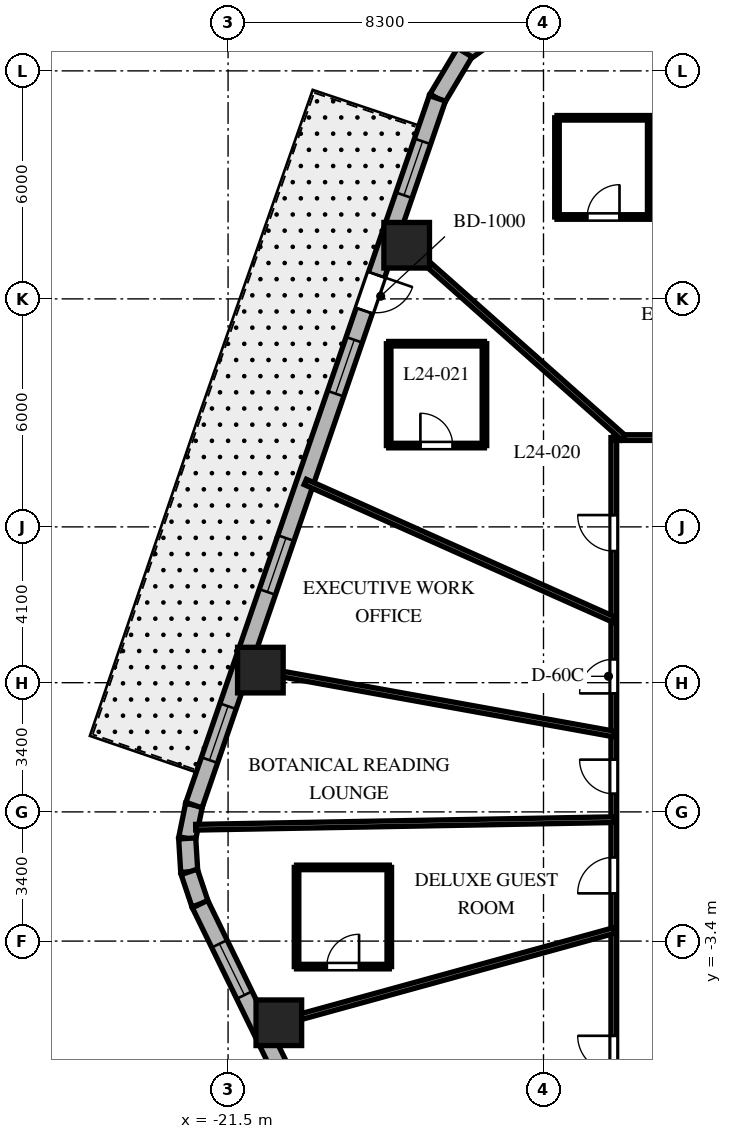
"""IFC4 building model, lengths in metres.
Left out: names, types, materials, properties, quantities, classifications, styles, units other than length and angle.
Written with IfcOpenShell. Run it as: python <this file> out.ifc"""

import sys

from ifc_helpers import new_model, si_unit, direction, frame, frame_2d, origin, origin_2d, place, context, subcontext, project, spatial, rectangle, extrude, element, fill, save


model = new_model("IFC4")
c1 = context("Model", 3, precision=1e-05, world=origin(), true_north=direction((0.0, 1.0)))
c2 = subcontext(c1, "Body", "Model", "MODEL_VIEW")
j1 = project(units=[si_unit("LENGTHUNIT", "METRE"), si_unit("PLANEANGLEUNIT", "RADIAN")], contexts=[c1])
p1 = place(None, origin())
s1 = spatial("IfcSite", under=j1, at=p1, CompositionType="ELEMENT")
p2 = place(p1, origin())
s2 = spatial("IfcBuilding", under=s1, at=p2, CompositionType="ELEMENT")
p3 = place(p2, frame((0.0, 0.0, 102.5)))
s3 = spatial("IfcBuildingStorey", under=s2, at=p3, CompositionType="ELEMENT", Elevation=102.5)
for number, where, z_axis, x_axis in (
    (1, (-16.8, 14.911, 0.0), (0.0, 0.0, 1.0), (1.0, 0.0, 0.0)),
    (2, (-20.65, 3.731, 0.0), (0.0, 0.0, 1.0), (1.0, 0.0, 0.0)),
    (3, (-20.164, -5.549, 0.0), (0.0, 0.0, 1.0), (1.0, 0.0, 0.0)),
):
    element("IfcColumn", number, at=place(p3, frame(where, z_axis=z_axis, x_axis=x_axis)), inside=s3, PredefinedType="COLUMN", context=c2, shape_type="SweptSolid", body=[
        extrude(rectangle(XDim=1.2, YDim=1.2, at=origin_2d()), origin(), (0.0, 0.0, 1.0), 3.7),
    ])
p4 = place(p3, frame((-14.146, 20.787, 0.0), z_axis=(0.0, 0.0, 1.0), x_axis=(-0.814162929117, -0.580636482536, 0.0)))
e4 = element("IfcWall", 4, at=p4, inside=s3, PredefinedType="SOLIDWALL", context=c2, shape_type="SweptSolid", body=[
    extrude(rectangle(XDim=1.382, YDim=0.45, at=frame_2d((0.691, 0.0))), origin(), (0.0, 0.0, 1.0), 3.4),
])
p5 = place(p3, frame((-15.272, 19.984, 0.0), z_axis=(0.0, 0.0, 1.0), x_axis=(-0.512579347361, -0.858639862025, 0.0)))
e5 = element("IfcWall", 5, at=p5, inside=s3, PredefinedType="SOLIDWALL", context=c2, shape_type="SweptSolid", body=[
    extrude(rectangle(XDim=1.406, YDim=0.45, at=frame_2d((0.703, 0.0))), origin(), (0.0, 0.0, 1.0), 3.4),
])
p6 = place(p3, frame((-22.397, 0.179, 0.0), z_axis=(0.0, 0.0, 1.0), x_axis=(-0.199313589404, -0.979935759669, 0.0)))
e6 = element("IfcWall", 6, at=p6, inside=s3, PredefinedType="SOLIDWALL", context=c2, shape_type="SweptSolid", body=[
    extrude(rectangle(XDim=0.896, YDim=0.45, at=frame_2d((0.448, 0.0))), origin(), (0.0, 0.0, 1.0), 3.4),
])
p7 = place(p3, frame((-22.575, -0.698, 0.0), z_axis=(0.0, 0.0, 1.0), x_axis=(0.060980441946, -0.998138961117, 0.0)))
e7 = element("IfcWall", 7, at=p7, inside=s3, PredefinedType="SOLIDWALL", context=c2, shape_type="SweptSolid", body=[
    extrude(rectangle(XDim=0.881, YDim=0.45, at=frame_2d((0.44, 0.0))), origin(), (0.0, 0.0, 1.0), 3.4),
])
p8 = place(p3, frame((-22.522, -1.577, 0.0), z_axis=(0.0, 0.0, 1.0), x_axis=(0.317372694837, -0.948300887151, 0.0)))
e8 = element("IfcWall", 8, at=p8, inside=s3, PredefinedType="SOLIDWALL", context=c2, shape_type="SweptSolid", body=[
    extrude(rectangle(XDim=0.896, YDim=0.45, at=frame_2d((0.448, 0.0))), origin(), (0.0, 0.0, 1.0), 3.4),
])
p9 = place(p3, frame((-15.992, 18.777, 0.0), z_axis=(0.0, 0.0, 1.0), x_axis=(-0.325606988926, -0.945505202927, 0.0)))
e9 = element("IfcWall", 9, at=p9, inside=s3, PredefinedType="SOLIDWALL", context=c2, shape_type="SweptSolid", body=[
    extrude(rectangle(XDim=19.669, YDim=0.45, at=frame_2d((9.835, 0.0))), origin(), (0.0, 0.0, 1.0), 3.4),
])
p10 = place(p9, frame((4.909, 0.0, 0.0)))
e10 = element("IfcOpeningElement", 10, at=p10, cuts=e9, PredefinedType="OPENING", context=c2, shape_type="SweptSolid", body=[
    extrude(rectangle(XDim=1.0, YDim=2.15, at=frame_2d((0.5, 1.075))), frame((0.0, 0.235, 0.0), z_axis=(0.0, -1.0, 0.0), x_axis=(1.0, 0.0, 0.0)), (0.0, 0.0, 1.0), 0.47),
])
p11 = place(p9, frame((1.197, 0.0, 0.8)))
e11 = element("IfcOpeningElement", 11, at=p11, cuts=e9, PredefinedType="OPENING", context=c2, shape_type="SweptSolid", body=[
    extrude(rectangle(XDim=1.5, YDim=1.8, at=frame_2d((0.75, 0.9))), frame((0.0, 0.235, 0.0), z_axis=(0.0, -1.0, 0.0), x_axis=(1.0, 0.0, 0.0)), (0.0, 0.0, 1.0), 0.47),
])
p12 = place(p9, frame((6.72, 0.0, 0.8)))
e12 = element("IfcOpeningElement", 12, at=p12, cuts=e9, PredefinedType="OPENING", context=c2, shape_type="SweptSolid", body=[
    extrude(rectangle(XDim=1.5, YDim=1.8, at=frame_2d((0.75, 0.9))), frame((0.0, 0.235, 0.0), z_axis=(0.0, -1.0, 0.0), x_axis=(1.0, 0.0, 0.0)), (0.0, 0.0, 1.0), 0.47),
])
p13 = place(p9, frame((12.238, 0.0, 0.8)))
e13 = element("IfcOpeningElement", 13, at=p13, cuts=e9, PredefinedType="OPENING", context=c2, shape_type="SweptSolid", body=[
    extrude(rectangle(XDim=1.5, YDim=1.8, at=frame_2d((0.75, 0.9))), frame((0.0, 0.235, 0.0), z_axis=(0.0, -1.0, 0.0), x_axis=(1.0, 0.0, 0.0)), (0.0, 0.0, 1.0), 0.47),
])
p14 = place(p9, frame((16.918, 0.0, 0.8)))
e14 = element("IfcOpeningElement", 14, at=p14, cuts=e9, PredefinedType="OPENING", context=c2, shape_type="SweptSolid", body=[
    extrude(rectangle(XDim=1.5, YDim=1.8, at=frame_2d((0.75, 0.9))), frame((0.0, 0.235, 0.0), z_axis=(0.0, -1.0, 0.0), x_axis=(1.0, 0.0, 0.0)), (0.0, 0.0, 1.0), 0.47),
])
p15 = place(p3, frame((-22.238, -2.427, 0.0), z_axis=(0.0, 0.0, 1.0), x_axis=(0.438374803278, -0.898792262901, 0.0)))
e15 = element("IfcWall", 15, at=p15, inside=s3, PredefinedType="SOLIDWALL", context=c2, shape_type="SweptSolid", body=[
    extrude(rectangle(XDim=18.618, YDim=0.45, at=frame_2d((9.309, 0.0))), origin(), (0.0, 0.0, 1.0), 3.4),
])
p16 = place(p15, frame((1.163, 0.0, 0.8)))
e16 = element("IfcOpeningElement", 16, at=p16, cuts=e15, PredefinedType="OPENING", context=c2, shape_type="SweptSolid", body=[
    extrude(rectangle(XDim=1.5, YDim=1.8, at=frame_2d((0.75, 0.9))), frame((0.0, 0.235, 0.0), z_axis=(0.0, -1.0, 0.0), x_axis=(1.0, 0.0, 0.0)), (0.0, 0.0, 1.0), 0.47),
])
p17 = place(p15, frame((8.61, 0.0, 0.8)))
e17 = element("IfcOpeningElement", 17, at=p17, cuts=e15, PredefinedType="OPENING", context=c2, shape_type="SweptSolid", body=[
    extrude(rectangle(XDim=1.5, YDim=1.8, at=frame_2d((0.75, 0.9))), frame((0.0, 0.235, 0.0), z_axis=(0.0, -1.0, 0.0), x_axis=(1.0, 0.0, 0.0)), (0.0, 0.0, 1.0), 0.47),
])
p18 = place(p15, frame((16.006, 0.0, 0.8)))
e18 = element("IfcOpeningElement", 18, at=p18, cuts=e15, PredefinedType="OPENING", context=c2, shape_type="SweptSolid", body=[
    extrude(rectangle(XDim=1.5, YDim=1.8, at=frame_2d((0.75, 0.9))), frame((0.0, 0.235, 0.0), z_axis=(0.0, -1.0, 0.0), x_axis=(1.0, 0.0, 0.0)), (0.0, 0.0, 1.0), 0.47),
])
p19 = place(p3, frame((-11.35, -9.85, 0.0), z_axis=(0.0, 0.0, 1.0), x_axis=(0.0, 1.0, 0.0)))
e19 = element("IfcWall", 19, at=p19, inside=s3, PredefinedType="PARTITIONING", context=c2, shape_type="SweptSolid", body=[
    extrude(rectangle(XDim=19.7, YDim=0.15, at=frame_2d((9.85, 0.0))), origin(), (0.0, 0.0, 1.0), 2.84),
])
p20 = place(p19, frame((16.711, 0.0, 0.0)))
e20 = element("IfcOpeningElement", 20, at=p20, cuts=e19, PredefinedType="OPENING", context=c2, shape_type="SweptSolid", body=[
    extrude(rectangle(XDim=0.95, YDim=2.03, at=frame_2d((0.475, 1.015))), frame((0.0, 0.085, 0.0), z_axis=(0.0, -1.0, 0.0), x_axis=(1.0, 0.0, 0.0)), (0.0, 0.0, 1.0), 0.17),
])
p21 = place(p19, frame((12.968, 0.0, 0.0)))
e21 = element("IfcOpeningElement", 21, at=p21, cuts=e19, PredefinedType="OPENING", context=c2, shape_type="SweptSolid", body=[
    extrude(rectangle(XDim=0.9, YDim=2.03, at=frame_2d((0.45, 1.015))), frame((0.0, 0.085, 0.0), z_axis=(0.0, -1.0, 0.0), x_axis=(1.0, 0.0, 0.0)), (0.0, 0.0, 1.0), 0.17),
])
p22 = place(p19, frame((10.325, 0.0, 0.0)))
e22 = element("IfcOpeningElement", 22, at=p22, cuts=e19, PredefinedType="OPENING", context=c2, shape_type="SweptSolid", body=[
    extrude(rectangle(XDim=0.9, YDim=2.03, at=frame_2d((0.45, 1.015))), frame((0.0, 0.085, 0.0), z_axis=(0.0, -1.0, 0.0), x_axis=(1.0, 0.0, 0.0)), (0.0, 0.0, 1.0), 0.17),
])
p23 = place(p19, frame((7.706, 0.0, 0.0)))
e23 = element("IfcOpeningElement", 23, at=p23, cuts=e19, PredefinedType="OPENING", context=c2, shape_type="SweptSolid", body=[
    extrude(rectangle(XDim=0.95, YDim=2.03, at=frame_2d((0.475, 1.015))), frame((0.0, 0.085, 0.0), z_axis=(0.0, -1.0, 0.0), x_axis=(1.0, 0.0, 0.0)), (0.0, 0.0, 1.0), 0.17),
])
p24 = place(p19, frame((3.008, 0.0, 0.0)))
e24 = element("IfcOpeningElement", 24, at=p24, cuts=e19, PredefinedType="OPENING", context=c2, shape_type="SweptSolid", body=[
    extrude(rectangle(XDim=0.95, YDim=2.03, at=frame_2d((0.475, 1.015))), frame((0.0, 0.085, 0.0), z_axis=(0.0, -1.0, 0.0), x_axis=(1.0, 0.0, 0.0)), (0.0, 0.0, 1.0), 0.17),
])
p25 = place(p3, frame((-11.35, 9.85, 0.0), z_axis=(0.0, 0.0, 1.0), x_axis=(1.0, 0.0, 0.0)))
e25 = element("IfcWall", 25, at=p25, inside=s3, PredefinedType="PARTITIONING", context=c2, shape_type="SweptSolid", body=[
    extrude(rectangle(XDim=22.7, YDim=0.15, at=frame_2d((11.35, 0.0))), origin(), (0.0, 0.0, 1.0), 2.84),
])
p26 = place(p25, frame((17.237, 0.0, 0.0)))
e26 = element("IfcOpeningElement", 26, at=p26, cuts=e25, PredefinedType="OPENING", context=c2, shape_type="SweptSolid", body=[
    extrude(rectangle(XDim=0.95, YDim=2.03, at=frame_2d((0.475, 1.015))), frame((0.0, 0.085, 0.0), z_axis=(0.0, -1.0, 0.0), x_axis=(1.0, 0.0, 0.0)), (0.0, 0.0, 1.0), 0.17),
])
p27 = place(p25, frame((10.45, 0.0, 0.0)))
e27 = element("IfcOpeningElement", 27, at=p27, cuts=e25, PredefinedType="OPENING", context=c2, shape_type="SweptSolid", body=[
    extrude(rectangle(XDim=0.95, YDim=2.03, at=frame_2d((0.475, 1.015))), frame((0.0, 0.085, 0.0), z_axis=(0.0, -1.0, 0.0), x_axis=(1.0, 0.0, 0.0)), (0.0, 0.0, 1.0), 0.17),
])
p28 = place(p25, frame((3.399, 0.0, 0.0)))
e28 = element("IfcOpeningElement", 28, at=p28, cuts=e25, PredefinedType="OPENING", context=c2, shape_type="SweptSolid", body=[
    extrude(rectangle(XDim=0.95, YDim=2.03, at=frame_2d((0.475, 1.015))), frame((0.0, 0.085, 0.0), z_axis=(0.0, -1.0, 0.0), x_axis=(1.0, 0.0, 0.0)), (0.0, 0.0, 1.0), 0.17),
])
p29 = place(p3, frame((-11.098, 9.85, 0.0), z_axis=(0.0, 0.0, 1.0), x_axis=(-0.747904295103, 0.663806572253, 0.0)))
e29 = element("IfcWall", 29, at=p29, inside=s3, PredefinedType="PARTITIONING", context=c2, shape_type="SweptSolid", body=[
    extrude(rectangle(XDim=8.16, YDim=0.15, at=frame_2d((4.08, 0.0))), origin(), (0.0, 0.0, 1.0), 2.54),
])
p30 = place(p3, frame((-11.35, 5.062, 0.0), z_axis=(0.0, 0.0, 1.0), x_axis=(-0.91329663997, 0.407295037312, 0.0)))
e30 = element("IfcWall", 30, at=p30, inside=s3, PredefinedType="PARTITIONING", context=c2, shape_type="SweptSolid", body=[
    extrude(rectangle(XDim=8.889, YDim=0.15, at=frame_2d((4.445, 0.0))), origin(), (0.0, 0.0, 1.0), 2.54),
])
p31 = place(p3, frame((-11.35, 2.051, 0.0), z_axis=(0.0, 0.0, 1.0), x_axis=(-0.984068313063, 0.177790762484, 0.0)))
e31 = element("IfcWall", 31, at=p31, inside=s3, PredefinedType="PARTITIONING", context=c2, shape_type="SweptSolid", body=[
    extrude(rectangle(XDim=9.951, YDim=0.15, at=frame_2d((4.976, 0.0))), origin(), (0.0, 0.0, 1.0), 2.54),
])
p32 = place(p3, frame((-11.35, -0.205, 0.0), z_axis=(0.0, 0.0, 1.0), x_axis=(-0.999836907568, -0.018059852275, 0.0)))
e32 = element("IfcWall", 32, at=p32, inside=s3, PredefinedType="PARTITIONING", context=c2, shape_type="SweptSolid", body=[
    extrude(rectangle(XDim=11.004, YDim=0.15, at=frame_2d((5.502, 0.0))), origin(), (0.0, 0.0, 1.0), 2.54),
])
p33 = place(p3, frame((-11.35, -3.123, 0.0), z_axis=(0.0, 0.0, 1.0), x_axis=(-0.964151983214, -0.265350623261, 0.0)))
e33 = element("IfcWall", 33, at=p33, inside=s3, PredefinedType="PARTITIONING", context=c2, shape_type="SweptSolid", body=[
    extrude(rectangle(XDim=9.645, YDim=0.15, at=frame_2d((4.823, 0.0))), origin(), (0.0, 0.0, 1.0), 2.54),
])
p34 = place(p3, frame((-12.845, 15.655, 0.0), z_axis=(0.0, 0.0, 1.0), x_axis=(1.0, 0.0, 0.0)))
e34 = element("IfcWall", 34, at=p34, inside=s3, PredefinedType="PARTITIONING", context=c2, shape_type="SweptSolid", body=[
    extrude(rectangle(XDim=2.44, YDim=0.12, at=frame_2d((1.22, 0.0))), origin(), (0.0, 0.0, 1.0), 3.4),
])
p35 = place(p34, frame((0.795, 0.0, 0.0)))
e35 = element("IfcOpeningElement", 35, at=p35, cuts=e34, PredefinedType="OPENING", context=c2, shape_type="SweptSolid", body=[
    extrude(rectangle(XDim=0.85, YDim=2.03, at=frame_2d((0.425, 1.015))), frame((0.0, 0.07, 0.0), z_axis=(0.0, -1.0, 0.0), x_axis=(1.0, 0.0, 0.0)), (0.0, 0.0, 1.0), 0.14),
])
p36 = place(p3, frame((-10.405, 15.655, 0.0), z_axis=(0.0, 0.0, 1.0), x_axis=(0.0, 1.0, 0.0)))
e36 = element("IfcWall", 36, at=p36, inside=s3, PredefinedType="PARTITIONING", context=c2, shape_type="SweptSolid", body=[
    extrude(rectangle(XDim=2.61, YDim=0.12, at=frame_2d((1.305, 0.0))), origin(), (0.0, 0.0, 1.0), 3.4),
])
p37 = place(p3, frame((-10.405, 18.265, 0.0), z_axis=(0.0, 0.0, 1.0), x_axis=(-1.0, 0.0, 0.0)))
e37 = element("IfcWall", 37, at=p37, inside=s3, PredefinedType="PARTITIONING", context=c2, shape_type="SweptSolid", body=[
    extrude(rectangle(XDim=2.44, YDim=0.12, at=frame_2d((1.22, 0.0))), origin(), (0.0, 0.0, 1.0), 2.54),
])
p38 = place(p3, frame((-12.845, 18.265, 0.0), z_axis=(0.0, 0.0, 1.0), x_axis=(0.0, -1.0, 0.0)))
e38 = element("IfcWall", 38, at=p38, inside=s3, PredefinedType="PARTITIONING", context=c2, shape_type="SweptSolid", body=[
    extrude(rectangle(XDim=2.61, YDim=0.12, at=frame_2d((1.305, 0.0))), origin(), (0.0, 0.0, 1.0), 2.54),
])
p39 = place(p3, frame((-17.274, 9.64, 0.0), z_axis=(0.0, 0.0, 1.0), x_axis=(1.0, 0.0, 0.0)))
e39 = element("IfcWall", 39, at=p39, inside=s3, PredefinedType="PARTITIONING", context=c2, shape_type="SweptSolid", body=[
    extrude(rectangle(XDim=2.52, YDim=0.12, at=frame_2d((1.26, 0.0))), origin(), (0.0, 0.0, 1.0), 2.972),
])
p40 = place(p39, frame((0.835, 0.0, 0.0)))
e40 = element("IfcOpeningElement", 40, at=p40, cuts=e39, PredefinedType="OPENING", context=c2, shape_type="SweptSolid", body=[
    extrude(rectangle(XDim=0.85, YDim=2.03, at=frame_2d((0.425, 1.015))), frame((0.0, 0.07, 0.0), z_axis=(0.0, -1.0, 0.0), x_axis=(1.0, 0.0, 0.0)), (0.0, 0.0, 1.0), 0.14),
])
p41 = place(p3, frame((-14.754, 9.64, 0.0), z_axis=(0.0, 0.0, 1.0), x_axis=(0.0, 1.0, 0.0)))
e41 = element("IfcWall", 41, at=p41, inside=s3, PredefinedType="PARTITIONING", context=c2, shape_type="SweptSolid", body=[
    extrude(rectangle(XDim=2.68, YDim=0.12, at=frame_2d((1.34, 0.0))), origin(), (0.0, 0.0, 1.0), 2.972),
])
p42 = place(p3, frame((-14.754, 12.32, 0.0), z_axis=(0.0, 0.0, 1.0), x_axis=(-1.0, 0.0, 0.0)))
e42 = element("IfcWall", 42, at=p42, inside=s3, PredefinedType="PARTITIONING", context=c2, shape_type="SweptSolid", body=[
    extrude(rectangle(XDim=2.52, YDim=0.12, at=frame_2d((1.26, 0.0))), origin(), (0.0, 0.0, 1.0), 3.4),
])
p43 = place(p3, frame((-17.274, 12.32, 0.0), z_axis=(0.0, 0.0, 1.0), x_axis=(0.0, -1.0, 0.0)))
e43 = element("IfcWall", 43, at=p43, inside=s3, PredefinedType="PARTITIONING", context=c2, shape_type="SweptSolid", body=[
    extrude(rectangle(XDim=2.68, YDim=0.12, at=frame_2d((1.34, 0.0))), origin(), (0.0, 0.0, 1.0), 3.4),
])
p44 = place(p3, frame((-19.698, -4.071, 0.0), z_axis=(0.0, 0.0, 1.0), x_axis=(1.0, 0.0, 0.0)))
e44 = element("IfcWall", 44, at=p44, inside=s3, PredefinedType="PARTITIONING", context=c2, shape_type="SweptSolid", body=[
    extrude(rectangle(XDim=2.44, YDim=0.12, at=frame_2d((1.22, 0.0))), origin(), (0.0, 0.0, 1.0), 3.4),
])
p45 = place(p44, frame((0.795, 0.0, 0.0)))
e45 = element("IfcOpeningElement", 45, at=p45, cuts=e44, PredefinedType="OPENING", context=c2, shape_type="SweptSolid", body=[
    extrude(rectangle(XDim=0.85, YDim=2.03, at=frame_2d((0.425, 1.015))), frame((0.0, 0.07, 0.0), z_axis=(0.0, -1.0, 0.0), x_axis=(1.0, 0.0, 0.0)), (0.0, 0.0, 1.0), 0.14),
])
p46 = place(p3, frame((-17.258, -4.071, 0.0), z_axis=(0.0, 0.0, 1.0), x_axis=(0.0, 1.0, 0.0)))
e46 = element("IfcWall", 46, at=p46, inside=s3, PredefinedType="PARTITIONING", context=c2, shape_type="SweptSolid", body=[
    extrude(rectangle(XDim=2.61, YDim=0.12, at=frame_2d((1.305, 0.0))), origin(), (0.0, 0.0, 1.0), 3.4),
])
p47 = place(p3, frame((-17.258, -1.461, 0.0), z_axis=(0.0, 0.0, 1.0), x_axis=(-1.0, 0.0, 0.0)))
e47 = element("IfcWall", 47, at=p47, inside=s3, PredefinedType="PARTITIONING", context=c2, shape_type="SweptSolid", body=[
    extrude(rectangle(XDim=2.44, YDim=0.12, at=frame_2d((1.22, 0.0))), origin(), (0.0, 0.0, 1.0), 3.4),
])
p48 = place(p3, frame((-19.698, -1.461, 0.0), z_axis=(0.0, 0.0, 1.0), x_axis=(0.0, -1.0, 0.0)))
e48 = element("IfcWall", 48, at=p48, inside=s3, PredefinedType="PARTITIONING", context=c2, shape_type="SweptSolid", body=[
    extrude(rectangle(XDim=2.61, YDim=0.12, at=frame_2d((1.305, 0.0))), origin(), (0.0, 0.0, 1.0), 3.4),
])
p49 = place(p10, origin())
e49 = element("IfcDoor", 49, at=p49, inside=s3, OperationType="SINGLE_SWING_LEFT", PredefinedType="DOOR", context=c2, shape_type="SweptSolid", body=[
    extrude(rectangle(XDim=1.0, YDim=2.15, at=frame_2d((0.5, 1.075))), frame((0.0, 0.025, 0.0), z_axis=(0.0, -1.0, 0.0), x_axis=(1.0, 0.0, 0.0)), (0.0, 0.0, 1.0), 0.05),
])
fill(e10, e49)
p50 = place(p11, origin())
e50 = element("IfcWindow", 50, at=p50, inside=s3, PartitioningType="SINGLE_PANEL", PredefinedType="WINDOW", context=c2, shape_type="SweptSolid", body=[
    extrude(rectangle(XDim=1.5, YDim=1.8, at=frame_2d((0.75, 0.9))), frame((0.0, 0.03, 0.0), z_axis=(0.0, -1.0, 0.0), x_axis=(1.0, 0.0, 0.0)), (0.0, 0.0, 1.0), 0.06),
])
fill(e11, e50)
p51 = place(p12, origin())
e51 = element("IfcWindow", 51, at=p51, inside=s3, PartitioningType="SINGLE_PANEL", PredefinedType="WINDOW", context=c2, shape_type="SweptSolid", body=[
    extrude(rectangle(XDim=1.5, YDim=1.8, at=frame_2d((0.75, 0.9))), frame((0.0, 0.03, 0.0), z_axis=(0.0, -1.0, 0.0), x_axis=(1.0, 0.0, 0.0)), (0.0, 0.0, 1.0), 0.06),
])
fill(e12, e51)
p52 = place(p13, origin())
e52 = element("IfcWindow", 52, at=p52, inside=s3, PartitioningType="SINGLE_PANEL", PredefinedType="WINDOW", context=c2, shape_type="SweptSolid", body=[
    extrude(rectangle(XDim=1.5, YDim=1.8, at=frame_2d((0.75, 0.9))), frame((0.0, 0.03, 0.0), z_axis=(0.0, -1.0, 0.0), x_axis=(1.0, 0.0, 0.0)), (0.0, 0.0, 1.0), 0.06),
])
fill(e13, e52)
p53 = place(p14, origin())
e53 = element("IfcWindow", 53, at=p53, inside=s3, PartitioningType="SINGLE_PANEL", PredefinedType="WINDOW", context=c2, shape_type="SweptSolid", body=[
    extrude(rectangle(XDim=1.5, YDim=1.8, at=frame_2d((0.75, 0.9))), frame((0.0, 0.03, 0.0), z_axis=(0.0, -1.0, 0.0), x_axis=(1.0, 0.0, 0.0)), (0.0, 0.0, 1.0), 0.06),
])
fill(e14, e53)
p54 = place(p16, origin())
e54 = element("IfcWindow", 54, at=p54, inside=s3, PartitioningType="SINGLE_PANEL", PredefinedType="WINDOW", context=c2, shape_type="SweptSolid", body=[
    extrude(rectangle(XDim=1.5, YDim=1.8, at=frame_2d((0.75, 0.9))), frame((0.0, 0.03, 0.0), z_axis=(0.0, -1.0, 0.0), x_axis=(1.0, 0.0, 0.0)), (0.0, 0.0, 1.0), 0.06),
])
fill(e16, e54)
p55 = place(p35, origin())
e55 = element("IfcDoor", 55, at=p55, inside=s3, OperationType="SINGLE_SWING_RIGHT", PredefinedType="DOOR", context=c2, shape_type="SweptSolid", body=[
    extrude(rectangle(XDim=0.85, YDim=2.03, at=frame_2d((0.425, 1.015))), frame((0.0, 0.025, 0.0), z_axis=(0.0, -1.0, 0.0), x_axis=(1.0, 0.0, 0.0)), (0.0, 0.0, 1.0), 0.05),
])
fill(e35, e55)
p56 = place(p20, origin())
e56 = element("IfcDoor", 56, at=p56, inside=s3, OperationType="SINGLE_SWING_RIGHT", PredefinedType="DOOR", context=c2, shape_type="SweptSolid", body=[
    extrude(rectangle(XDim=0.95, YDim=2.03, at=frame_2d((0.475, 1.015))), frame((0.0, 0.025, 0.0), z_axis=(0.0, -1.0, 0.0), x_axis=(1.0, 0.0, 0.0)), (0.0, 0.0, 1.0), 0.05),
])
fill(e20, e56)
p57 = place(p40, origin())
e57 = element("IfcDoor", 57, at=p57, inside=s3, OperationType="SINGLE_SWING_LEFT", PredefinedType="DOOR", context=c2, shape_type="SweptSolid", body=[
    extrude(rectangle(XDim=0.85, YDim=2.03, at=frame_2d((0.425, 1.015))), frame((0.0, 0.025, 0.0), z_axis=(0.0, -1.0, 0.0), x_axis=(1.0, 0.0, 0.0)), (0.0, 0.0, 1.0), 0.05),
])
fill(e40, e57)
p58 = place(p21, origin())
e58 = element("IfcDoor", 58, at=p58, inside=s3, OperationType="SINGLE_SWING_LEFT", PredefinedType="DOOR", context=c2, shape_type="SweptSolid", body=[
    extrude(rectangle(XDim=0.9, YDim=2.03, at=frame_2d((0.45, 1.015))), frame((0.0, 0.025, 0.0), z_axis=(0.0, -1.0, 0.0), x_axis=(1.0, 0.0, 0.0)), (0.0, 0.0, 1.0), 0.05),
])
fill(e21, e58)
p59 = place(p22, origin())
e59 = element("IfcDoor", 59, at=p59, inside=s3, OperationType="SINGLE_SWING_RIGHT", PredefinedType="DOOR", context=c2, shape_type="SweptSolid", body=[
    extrude(rectangle(XDim=0.9, YDim=2.03, at=frame_2d((0.45, 1.015))), frame((0.0, 0.025, 0.0), z_axis=(0.0, -1.0, 0.0), x_axis=(1.0, 0.0, 0.0)), (0.0, 0.0, 1.0), 0.05),
])
fill(e22, e59)
p60 = place(p23, origin())
e60 = element("IfcDoor", 60, at=p60, inside=s3, OperationType="SINGLE_SWING_LEFT", PredefinedType="DOOR", context=c2, shape_type="SweptSolid", body=[
    extrude(rectangle(XDim=0.95, YDim=2.03, at=frame_2d((0.475, 1.015))), frame((0.0, 0.025, 0.0), z_axis=(0.0, -1.0, 0.0), x_axis=(1.0, 0.0, 0.0)), (0.0, 0.0, 1.0), 0.05),
])
fill(e23, e60)
p61 = place(p45, origin())
e61 = element("IfcDoor", 61, at=p61, inside=s3, OperationType="SINGLE_SWING_RIGHT", PredefinedType="DOOR", context=c2, shape_type="SweptSolid", body=[
    extrude(rectangle(XDim=0.85, YDim=2.03, at=frame_2d((0.425, 1.015))), frame((0.0, 0.025, 0.0), z_axis=(0.0, -1.0, 0.0), x_axis=(1.0, 0.0, 0.0)), (0.0, 0.0, 1.0), 0.05),
])
fill(e45, e61)
p62 = place(p24, origin())
e62 = element("IfcDoor", 62, at=p62, inside=s3, OperationType="SINGLE_SWING_RIGHT", PredefinedType="DOOR", context=c2, shape_type="SweptSolid", body=[
    extrude(rectangle(XDim=0.95, YDim=2.03, at=frame_2d((0.475, 1.015))), frame((0.0, 0.025, 0.0), z_axis=(0.0, -1.0, 0.0), x_axis=(1.0, 0.0, 0.0)), (0.0, 0.0, 1.0), 0.05),
])
fill(e24, e62)
save(model, sys.argv[1])
